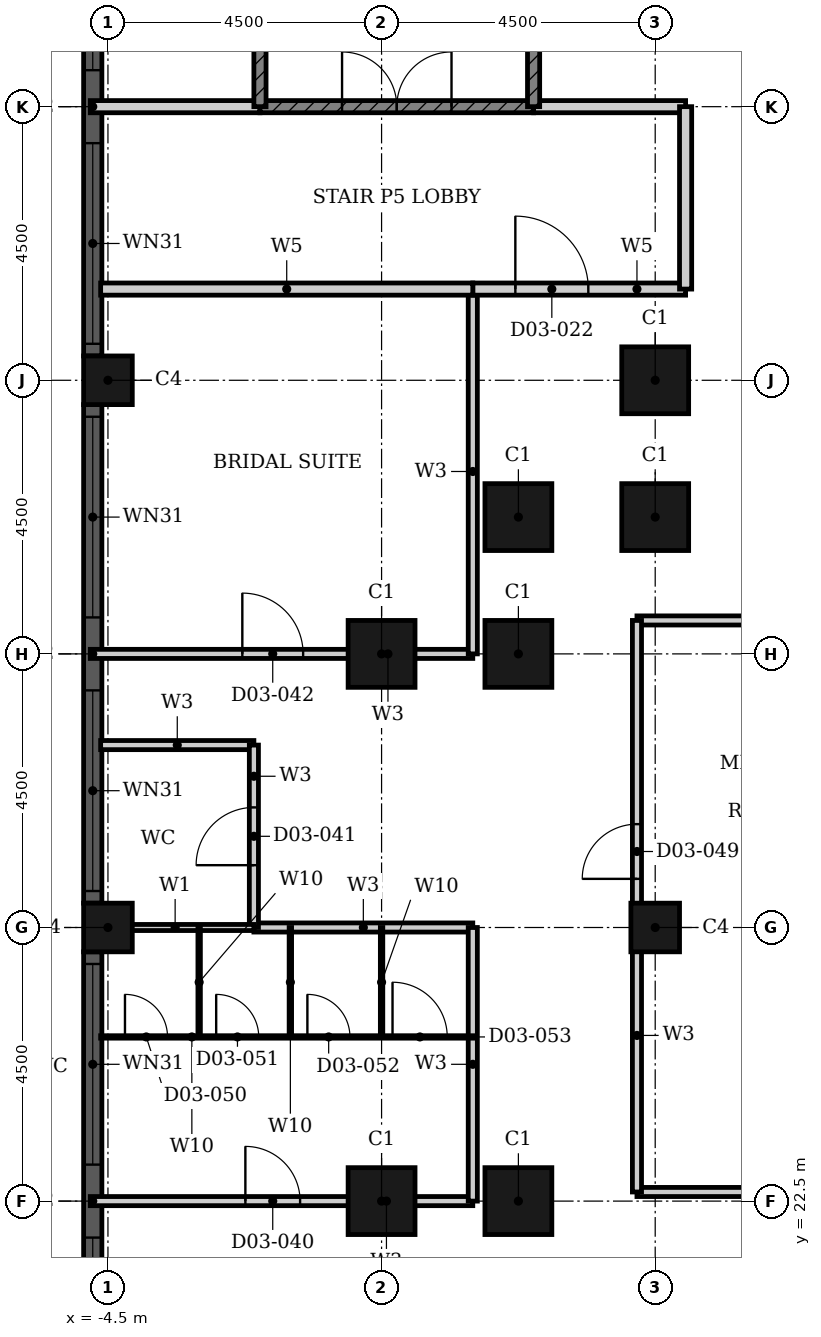
"""IFC4 building model, lengths in metres.
Left out: names, types, materials, properties, quantities, classifications, styles, units other than length and angle.
Written with IfcOpenShell. Run it as: python <this file> out.ifc"""

import sys

from ifc_helpers import new_model, si_unit, direction, frame, frame_2d, origin, origin_2d, place, context, subcontext, project, spatial, rectangle, hollow_rectangle, extrude, element, fill, save


model = new_model("IFC4")
c1 = context("Model", 3, precision=1e-05, world=origin(), true_north=direction((0.0, 1.0)))
c2 = subcontext(c1, "Body", "Model", "MODEL_VIEW")
j1 = project(units=[si_unit("LENGTHUNIT", "METRE"), si_unit("PLANEANGLEUNIT", "RADIAN")], contexts=[c1])
p1 = place(None, origin())
s1 = spatial("IfcSite", under=j1, at=p1, CompositionType="ELEMENT")
p2 = place(p1, origin())
s2 = spatial("IfcBuilding", under=s1, at=p2, CompositionType="ELEMENT")
p3 = place(p2, frame((0.0, 0.0, 17.4)))
s3 = spatial("IfcBuildingStorey", under=s2, at=p3, CompositionType="ELEMENT", Elevation=17.4)
for number, where, z_axis, x_axis in (
    (1, (4.5, 36.0, 0.0), (0.0, 0.0, 1.0), (1.0, 0.0, 0.0)),
    (2, (4.5, 33.75, 0.0), (0.0, 0.0, 1.0), (1.0, 0.0, 0.0)),
    (3, (2.25, 33.75, 0.0), (0.0, 0.0, 1.0), (1.0, 0.0, 0.0)),
    (4, (2.25, 31.5, 0.0), (0.0, 0.0, 1.0), (1.0, 0.0, 0.0)),
    (5, (0.0, 31.5, 0.0), (0.0, 0.0, 1.0), (1.0, 0.0, 0.0)),
    (6, (0.0, 22.5, 0.0), (0.0, 0.0, 1.0), (1.0, 0.0, 0.0)),
    (7, (2.25, 22.5, 0.0), (0.0, 0.0, 1.0), (1.0, 0.0, 0.0)),
):
    element("IfcColumn", number, at=place(p3, frame(where, z_axis=z_axis, x_axis=x_axis)), inside=s3, PredefinedType="COLUMN", context=c2, shape_type="SweptSolid", body=[
        extrude(hollow_rectangle(XDim=1.1, YDim=1.1, WallThickness=0.036, at=origin_2d()), origin(), (0.0, 0.0, 1.0), 6.6),
    ])
for number, where, z_axis, x_axis in (
    (8, (-4.5, 27.0, 0.0), (0.0, 0.0, 1.0), (1.0, 0.0, 0.0)),
    (9, (-4.5, 36.0, 0.0), (0.0, 0.0, 1.0), (1.0, 0.0, 0.0)),
    (10, (4.5, 27.0, 0.0), (0.0, 0.0, 1.0), (1.0, 0.0, 0.0)),
):
    element("IfcColumn", number, at=place(p3, frame(where, z_axis=z_axis, x_axis=x_axis)), inside=s3, PredefinedType="COLUMN", context=c2, shape_type="SweptSolid", body=[
        extrude(hollow_rectangle(XDim=0.8, YDim=0.8, WallThickness=0.025, at=origin_2d()), origin(), (0.0, 0.0, 1.0), 6.6),
    ])
p4 = place(p3, frame((-4.75, 44.6, 0.0), z_axis=(0.0, 0.0, 1.0), x_axis=(0.0, -1.0, 0.0)))
e11 = element("IfcWall", 11, at=p4, inside=s3, PredefinedType="SOLIDWALL", context=c2, shape_type="SweptSolid", body=[
    extrude(rectangle(XDim=8.2, YDim=0.3, at=frame_2d((4.1, 0.0))), origin(), (0.0, 0.0, 1.0), 6.6),
])
p5 = place(p4, frame((0.2, 0.0, 0.9)))
e12 = element("IfcOpeningElement", 12, at=p5, cuts=e11, PredefinedType="OPENING", context=c2, shape_type="SweptSolid", body=[
    extrude(rectangle(XDim=3.3, YDim=3.6, at=frame_2d((1.65, 1.8))), frame((0.0, 0.16, 0.0), z_axis=(0.0, -1.0, 0.0), x_axis=(1.0, 0.0, 0.0)), (0.0, 0.0, 1.0), 0.32),
])
p6 = place(p4, frame((4.7, 0.0, 0.9)))
e13 = element("IfcOpeningElement", 13, at=p6, cuts=e11, PredefinedType="OPENING", context=c2, shape_type="SweptSolid", body=[
    extrude(rectangle(XDim=3.3, YDim=3.6, at=frame_2d((1.65, 1.8))), frame((0.0, 0.16, 0.0), z_axis=(0.0, -1.0, 0.0), x_axis=(1.0, 0.0, 0.0)), (0.0, 0.0, 1.0), 0.32),
])
p7 = place(p3, frame((-4.75, 35.6, 0.0), z_axis=(0.0, 0.0, 1.0), x_axis=(0.0, -1.0, 0.0)))
e14 = element("IfcWall", 14, at=p7, inside=s3, PredefinedType="SOLIDWALL", context=c2, shape_type="SweptSolid", body=[
    extrude(rectangle(XDim=8.2, YDim=0.3, at=frame_2d((4.1, 0.0))), origin(), (0.0, 0.0, 1.0), 6.6),
])
p8 = place(p7, frame((0.2, 0.0, 0.9)))
e15 = element("IfcOpeningElement", 15, at=p8, cuts=e14, PredefinedType="OPENING", context=c2, shape_type="SweptSolid", body=[
    extrude(rectangle(XDim=3.3, YDim=3.6, at=frame_2d((1.65, 1.8))), frame((0.0, 0.16, 0.0), z_axis=(0.0, -1.0, 0.0), x_axis=(1.0, 0.0, 0.0)), (0.0, 0.0, 1.0), 0.32),
])
p9 = place(p7, frame((4.7, 0.0, 0.9)))
e16 = element("IfcOpeningElement", 16, at=p9, cuts=e14, PredefinedType="OPENING", context=c2, shape_type="SweptSolid", body=[
    extrude(rectangle(XDim=3.3, YDim=3.6, at=frame_2d((1.65, 1.8))), frame((0.0, 0.16, 0.0), z_axis=(0.0, -1.0, 0.0), x_axis=(1.0, 0.0, 0.0)), (0.0, 0.0, 1.0), 0.32),
])
p10 = place(p3, frame((-4.75, 26.6, 0.0), z_axis=(0.0, 0.0, 1.0), x_axis=(0.0, -1.0, 0.0)))
e17 = element("IfcWall", 17, at=p10, inside=s3, PredefinedType="SOLIDWALL", context=c2, shape_type="SweptSolid", body=[
    extrude(rectangle(XDim=8.2, YDim=0.3, at=frame_2d((4.1, 0.0))), origin(), (0.0, 0.0, 1.0), 6.6),
])
p11 = place(p10, frame((0.2, 0.0, 0.9)))
e18 = element("IfcOpeningElement", 18, at=p11, cuts=e17, PredefinedType="OPENING", context=c2, shape_type="SweptSolid", body=[
    extrude(rectangle(XDim=3.3, YDim=3.6, at=frame_2d((1.65, 1.8))), frame((0.0, 0.16, 0.0), z_axis=(0.0, -1.0, 0.0), x_axis=(1.0, 0.0, 0.0)), (0.0, 0.0, 1.0), 0.32),
])
p12 = place(p10, frame((4.7, 0.0, 0.9)))
e19 = element("IfcOpeningElement", 19, at=p12, cuts=e17, PredefinedType="OPENING", context=c2, shape_type="SweptSolid", body=[
    extrude(rectangle(XDim=3.3, YDim=3.6, at=frame_2d((1.65, 1.8))), frame((0.0, 0.16, 0.0), z_axis=(0.0, -1.0, 0.0), x_axis=(1.0, 0.0, 0.0)), (0.0, 0.0, 1.0), 0.32),
])
p13 = place(p3, frame((-4.79, 22.5, 0.0), z_axis=(0.0, 0.0, 1.0), x_axis=(1.0, 0.0, 0.0)))
e20 = element("IfcWall", 20, at=p13, inside=s3, PredefinedType="PARTITIONING", context=c2, shape_type="SweptSolid", body=[
    extrude(rectangle(XDim=6.29, YDim=0.15, at=frame_2d((3.145, 0.0))), origin(), (0.0, 0.0, 1.0), 6.25),
])
p14 = place(p13, frame((2.55, 0.0, 0.0)))
e21 = element("IfcOpeningElement", 21, at=p14, cuts=e20, PredefinedType="OPENING", context=c2, shape_type="SweptSolid", body=[
    extrude(rectangle(XDim=0.9, YDim=2.1, at=frame_2d((0.45, 1.05))), frame((0.0, 0.085, 0.0), z_axis=(0.0, -1.0, 0.0), x_axis=(1.0, 0.0, 0.0)), (0.0, 0.0, 1.0), 0.17),
])
p15 = place(p3, frame((4.2, 22.65, 0.0), z_axis=(0.0, 0.0, 1.0), x_axis=(1.0, 0.0, 0.0)))
e22 = element("IfcWall", 22, at=p15, inside=s3, PredefinedType="PARTITIONING", context=c2, shape_type="SweptSolid", body=[
    extrude(rectangle(XDim=4.45, YDim=0.15, at=frame_2d((2.225, 0.0))), origin(), (0.0, 0.0, 1.0), 6.25),
])
p16 = place(p3, frame((-2.1, 27.0, 0.0), z_axis=(0.0, 0.0, 1.0), x_axis=(1.0, 0.0, 0.0)))
e23 = element("IfcWall", 23, at=p16, inside=s3, PredefinedType="PARTITIONING", context=c2, shape_type="SweptSolid", body=[
    extrude(rectangle(XDim=3.6, YDim=0.15, at=frame_2d((1.8, 0.0))), origin(), (0.0, 0.0, 1.0), 6.25),
])
p17 = place(p3, frame((-4.62, 30.0, 0.0), z_axis=(0.0, 0.0, 1.0), x_axis=(1.0, 0.0, 0.0)))
e24 = element("IfcWall", 24, at=p17, inside=s3, PredefinedType="PARTITIONING", context=c2, shape_type="SweptSolid", body=[
    extrude(rectangle(XDim=2.52, YDim=0.15, at=frame_2d((1.26, 0.0))), origin(), (0.0, 0.0, 1.0), 6.25),
])
p18 = place(p3, frame((-4.79, 31.5, 0.0), z_axis=(0.0, 0.0, 1.0), x_axis=(1.0, 0.0, 0.0)))
e25 = element("IfcWall", 25, at=p18, inside=s3, PredefinedType="PARTITIONING", context=c2, shape_type="SweptSolid", body=[
    extrude(rectangle(XDim=6.29, YDim=0.15, at=frame_2d((3.145, 0.0))), origin(), (0.0, 0.0, 1.0), 6.25),
])
p19 = place(p18, frame((2.5, 0.0, 0.0)))
e26 = element("IfcOpeningElement", 26, at=p19, cuts=e25, PredefinedType="OPENING", context=c2, shape_type="SweptSolid", body=[
    extrude(rectangle(XDim=1.0, YDim=2.1, at=frame_2d((0.5, 1.05))), frame((0.0, 0.085, 0.0), z_axis=(0.0, -1.0, 0.0), x_axis=(1.0, 0.0, 0.0)), (0.0, 0.0, 1.0), 0.17),
])
p20 = place(p3, frame((4.2, 32.05, 0.0), z_axis=(0.0, 0.0, 1.0), x_axis=(1.0, 0.0, 0.0)))
e27 = element("IfcWall", 27, at=p20, inside=s3, PredefinedType="PARTITIONING", context=c2, shape_type="SweptSolid", body=[
    extrude(rectangle(XDim=4.45, YDim=0.15, at=frame_2d((2.225, 0.0))), origin(), (0.0, 0.0, 1.0), 6.25),
])
p21 = place(p3, frame((-2.1, 27.0, 0.0), z_axis=(0.0, 0.0, 1.0), x_axis=(0.0, 1.0, 0.0)))
e28 = element("IfcWall", 28, at=p21, inside=s3, PredefinedType="PARTITIONING", context=c2, shape_type="SweptSolid", body=[
    extrude(rectangle(XDim=3.0, YDim=0.15, at=frame_2d((1.5, 0.0))), origin(), (0.0, 0.0, 1.0), 6.25),
])
p22 = place(p21, frame((1.025, 0.0, 0.0)))
e29 = element("IfcOpeningElement", 29, at=p22, cuts=e28, PredefinedType="OPENING", context=c2, shape_type="SweptSolid", body=[
    extrude(rectangle(XDim=0.95, YDim=2.1, at=frame_2d((0.475, 1.05))), frame((0.0, 0.085, 0.0), z_axis=(0.0, -1.0, 0.0), x_axis=(1.0, 0.0, 0.0)), (0.0, 0.0, 1.0), 0.17),
])
p23 = place(p3, frame((1.5, 22.5, 0.0), z_axis=(0.0, 0.0, 1.0), x_axis=(0.0, 1.0, 0.0)))
e30 = element("IfcWall", 30, at=p23, inside=s3, PredefinedType="PARTITIONING", context=c2, shape_type="SweptSolid", body=[
    extrude(rectangle(XDim=4.5, YDim=0.15, at=frame_2d((2.25, 0.0))), origin(), (0.0, 0.0, 1.0), 6.25),
])
p24 = place(p3, frame((1.5, 31.5, 0.0), z_axis=(0.0, 0.0, 1.0), x_axis=(0.0, 1.0, 0.0)))
e31 = element("IfcWall", 31, at=p24, inside=s3, PredefinedType="PARTITIONING", context=c2, shape_type="SweptSolid", body=[
    extrude(rectangle(XDim=6.0, YDim=0.15, at=frame_2d((3.0, 0.0))), origin(), (0.0, 0.0, 1.0), 6.25),
])
p25 = place(p3, frame((4.2, 22.65, 0.0), z_axis=(0.0, 0.0, 1.0), x_axis=(0.0, 1.0, 0.0)))
e32 = element("IfcWall", 32, at=p25, inside=s3, PredefinedType="PARTITIONING", context=c2, shape_type="SweptSolid", body=[
    extrude(rectangle(XDim=9.4, YDim=0.15, at=frame_2d((4.7, 0.0))), origin(), (0.0, 0.0, 1.0), 6.25),
])
p26 = place(p25, frame((5.15, 0.0, 0.0)))
e33 = element("IfcOpeningElement", 33, at=p26, cuts=e32, PredefinedType="OPENING", context=c2, shape_type="SweptSolid", body=[
    extrude(rectangle(XDim=0.9, YDim=2.1, at=frame_2d((0.45, 1.05))), frame((0.0, 0.085, 0.0), z_axis=(0.0, -1.0, 0.0), x_axis=(1.0, 0.0, 0.0)), (0.0, 0.0, 1.0), 0.17),
])
p27 = place(p3, frame((-4.69, 27.0, 0.0), z_axis=(0.0, 0.0, 1.0), x_axis=(1.0, 0.0, 0.0)))
e34 = element("IfcWall", 34, at=p27, inside=s3, PredefinedType="PARTITIONING", context=c2, shape_type="SweptSolid", body=[
    extrude(rectangle(XDim=2.59, YDim=0.1, at=frame_2d((1.295, 0.0))), origin(), (0.0, 0.0, 1.0), 6.25),
])
p28 = place(p3, frame((1.5, 37.5, 0.0), z_axis=(0.0, 0.0, 1.0), x_axis=(1.0, 0.0, 0.0)))
e35 = element("IfcWall", 35, at=p28, inside=s3, PredefinedType="PARTITIONING", context=c2, shape_type="SweptSolid", body=[
    extrude(rectangle(XDim=3.5, YDim=0.2, at=frame_2d((1.75, 0.0))), origin(), (0.0, 0.0, 1.0), 6.25),
])
p29 = place(p28, frame((0.7, 0.0, 0.0)))
e36 = element("IfcOpeningElement", 36, at=p29, cuts=e35, PredefinedType="OPENING", context=c2, shape_type="SweptSolid", body=[
    extrude(rectangle(XDim=1.2, YDim=2.1, at=frame_2d((0.6, 1.05))), frame((0.0, 0.11, 0.0), z_axis=(0.0, -1.0, 0.0), x_axis=(1.0, 0.0, 0.0)), (0.0, 0.0, 1.0), 0.22),
])
p30 = place(p3, frame((-4.62, 37.5, 0.0), z_axis=(0.0, 0.0, 1.0), x_axis=(1.0, 0.0, 0.0)))
e37 = element("IfcWall", 37, at=p30, inside=s3, PredefinedType="PARTITIONING", context=c2, shape_type="SweptSolid", body=[
    extrude(rectangle(XDim=6.12, YDim=0.2, at=frame_2d((3.06, 0.0))), origin(), (0.0, 0.0, 1.0), 6.25),
])
p31 = place(p3, frame((2.5, 40.5, 0.0), z_axis=(0.0, 0.0, 1.0), x_axis=(1.0, 0.0, 0.0)))
e38 = element("IfcWall", 38, at=p31, inside=s3, PredefinedType="PARTITIONING", context=c2, shape_type="SweptSolid", body=[
    extrude(rectangle(XDim=2.5, YDim=0.2, at=frame_2d((1.25, 0.0))), origin(), (0.0, 0.0, 1.0), 6.25),
])
p32 = place(p3, frame((-4.79, 40.5, 0.0), z_axis=(0.0, 0.0, 1.0), x_axis=(1.0, 0.0, 0.0)))
e39 = element("IfcWall", 39, at=p32, inside=s3, PredefinedType="PARTITIONING", context=c2, shape_type="SweptSolid", body=[
    extrude(rectangle(XDim=2.79, YDim=0.2, at=frame_2d((1.395, 0.0))), origin(), (0.0, 0.0, 1.0), 6.25),
])
p33 = place(p3, frame((5.0, 37.5, 0.0), z_axis=(0.0, 0.0, 1.0), x_axis=(0.0, 1.0, 0.0)))
e40 = element("IfcWall", 40, at=p33, inside=s3, PredefinedType="PARTITIONING", context=c2, shape_type="SweptSolid", body=[
    extrude(rectangle(XDim=3.0, YDim=0.2, at=frame_2d((1.5, 0.0))), origin(), (0.0, 0.0, 1.0), 6.25),
])
p34 = place(p3, frame((-2.0, 40.5, 0.0), z_axis=(0.0, 0.0, 1.0), x_axis=(1.0, 0.0, 0.0)))
e41 = element("IfcWall", 41, at=p34, inside=s3, PredefinedType="SHEAR", context=c2, shape_type="SweptSolid", body=[
    extrude(rectangle(XDim=4.5, YDim=0.2, at=frame_2d((2.25, 0.0))), origin(), (0.0, 0.0, 1.0), 6.25),
])
p35 = place(p34, frame((1.35, 0.0, 0.0)))
e42 = element("IfcOpeningElement", 42, at=p35, cuts=e41, PredefinedType="OPENING", context=c2, shape_type="SweptSolid", body=[
    extrude(rectangle(XDim=1.8, YDim=2.1, at=frame_2d((0.9, 1.05))), frame((0.0, 0.11, 0.0), z_axis=(0.0, -1.0, 0.0), x_axis=(1.0, 0.0, 0.0)), (0.0, 0.0, 1.0), 0.22),
])
p36 = place(p3, frame((-2.0, 40.5, 0.0), z_axis=(0.0, 0.0, 1.0), x_axis=(0.0, 1.0, 0.0)))
e43 = element("IfcWall", 43, at=p36, inside=s3, PredefinedType="SHEAR", context=c2, shape_type="SweptSolid", body=[
    extrude(rectangle(XDim=8.45, YDim=0.2, at=frame_2d((4.225, 0.0))), origin(), (0.0, 0.0, 1.0), 6.25),
])
p37 = place(p3, frame((2.5, 40.5, 0.0), z_axis=(0.0, 0.0, 1.0), x_axis=(0.0, 1.0, 0.0)))
e44 = element("IfcWall", 44, at=p37, inside=s3, PredefinedType="SHEAR", context=c2, shape_type="SweptSolid", body=[
    extrude(rectangle(XDim=4.5, YDim=0.2, at=frame_2d((2.25, 0.0))), origin(), (0.0, 0.0, 1.0), 6.25),
])
for number, where, z_axis, x_axis in (
    (45, (-3.0, 27.0, 0.0), (0.0, 0.0, 1.0), (0.0, -1.0, 0.0)),
    (46, (-1.5, 27.0, 0.0), (0.0, 0.0, 1.0), (0.0, -1.0, 0.0)),
    (47, (0.0, 27.0, 0.0), (0.0, 0.0, 1.0), (0.0, -1.0, 0.0)),
):
    element("IfcWall", number, at=place(p3, frame(where, z_axis=z_axis, x_axis=x_axis)), inside=s3, PredefinedType="PARTITIONING", context=c2, shape_type="SweptSolid", body=[
        extrude(rectangle(XDim=1.8, YDim=0.04, at=frame_2d((0.9, 0.0))), origin(), (0.0, 0.0, 1.0), 6.25),
    ])
p38 = place(p3, frame((-4.62, 25.2, 0.0), z_axis=(0.0, 0.0, 1.0), x_axis=(1.0, 0.0, 0.0)))
e48 = element("IfcWall", 48, at=p38, inside=s3, PredefinedType="PARTITIONING", context=c2, shape_type="SweptSolid", body=[
    extrude(rectangle(XDim=6.12, YDim=0.04, at=frame_2d((3.06, 0.0))), origin(), (0.0, 0.0, 1.0), 6.25),
])
p39 = place(p38, frame((0.4, 0.0, 0.0)))
e49 = element("IfcOpeningElement", 49, at=p39, cuts=e48, PredefinedType="OPENING", context=c2, shape_type="SweptSolid", body=[
    extrude(rectangle(XDim=0.7, YDim=2.0, at=frame_2d((0.35, 1.0))), frame((0.0, 0.03, 0.0), z_axis=(0.0, -1.0, 0.0), x_axis=(1.0, 0.0, 0.0)), (0.0, 0.0, 1.0), 0.06),
])
p40 = place(p38, frame((1.9, 0.0, 0.0)))
e50 = element("IfcOpeningElement", 50, at=p40, cuts=e48, PredefinedType="OPENING", context=c2, shape_type="SweptSolid", body=[
    extrude(rectangle(XDim=0.7, YDim=2.0, at=frame_2d((0.35, 1.0))), frame((0.0, 0.03, 0.0), z_axis=(0.0, -1.0, 0.0), x_axis=(1.0, 0.0, 0.0)), (0.0, 0.0, 1.0), 0.06),
])
p41 = place(p38, frame((3.4, 0.0, 0.0)))
e51 = element("IfcOpeningElement", 51, at=p41, cuts=e48, PredefinedType="OPENING", context=c2, shape_type="SweptSolid", body=[
    extrude(rectangle(XDim=0.7, YDim=2.0, at=frame_2d((0.35, 1.0))), frame((0.0, 0.03, 0.0), z_axis=(0.0, -1.0, 0.0), x_axis=(1.0, 0.0, 0.0)), (0.0, 0.0, 1.0), 0.06),
])
p42 = place(p38, frame((4.8, 0.0, 0.0)))
e52 = element("IfcOpeningElement", 52, at=p42, cuts=e48, PredefinedType="OPENING", context=c2, shape_type="SweptSolid", body=[
    extrude(rectangle(XDim=0.9, YDim=2.0, at=frame_2d((0.45, 1.0))), frame((0.0, 0.03, 0.0), z_axis=(0.0, -1.0, 0.0), x_axis=(1.0, 0.0, 0.0)), (0.0, 0.0, 1.0), 0.06),
])
p43 = place(p5, origin())
e53 = element("IfcWindow", 53, at=p43, inside=s3, PartitioningType="SINGLE_PANEL", PredefinedType="WINDOW", context=c2, shape_type="SweptSolid", body=[
    extrude(rectangle(XDim=3.3, YDim=3.6, at=frame_2d((1.65, 1.8))), frame((0.0, 0.03, 0.0), z_axis=(0.0, -1.0, 0.0), x_axis=(1.0, 0.0, 0.0)), (0.0, 0.0, 1.0), 0.06),
])
fill(e12, e53)
p44 = place(p6, origin())
e54 = element("IfcWindow", 54, at=p44, inside=s3, PartitioningType="SINGLE_PANEL", PredefinedType="WINDOW", context=c2, shape_type="SweptSolid", body=[
    extrude(rectangle(XDim=3.3, YDim=3.6, at=frame_2d((1.65, 1.8))), frame((0.0, 0.03, 0.0), z_axis=(0.0, -1.0, 0.0), x_axis=(1.0, 0.0, 0.0)), (0.0, 0.0, 1.0), 0.06),
])
fill(e13, e54)
p45 = place(p8, origin())
e55 = element("IfcWindow", 55, at=p45, inside=s3, PartitioningType="SINGLE_PANEL", PredefinedType="WINDOW", context=c2, shape_type="SweptSolid", body=[
    extrude(rectangle(XDim=3.3, YDim=3.6, at=frame_2d((1.65, 1.8))), frame((0.0, 0.03, 0.0), z_axis=(0.0, -1.0, 0.0), x_axis=(1.0, 0.0, 0.0)), (0.0, 0.0, 1.0), 0.06),
])
fill(e15, e55)
p46 = place(p9, origin())
e56 = element("IfcWindow", 56, at=p46, inside=s3, PartitioningType="SINGLE_PANEL", PredefinedType="WINDOW", context=c2, shape_type="SweptSolid", body=[
    extrude(rectangle(XDim=3.3, YDim=3.6, at=frame_2d((1.65, 1.8))), frame((0.0, 0.03, 0.0), z_axis=(0.0, -1.0, 0.0), x_axis=(1.0, 0.0, 0.0)), (0.0, 0.0, 1.0), 0.06),
])
fill(e16, e56)
p47 = place(p11, origin())
e57 = element("IfcWindow", 57, at=p47, inside=s3, PartitioningType="SINGLE_PANEL", PredefinedType="WINDOW", context=c2, shape_type="SweptSolid", body=[
    extrude(rectangle(XDim=3.3, YDim=3.6, at=frame_2d((1.65, 1.8))), frame((0.0, 0.03, 0.0), z_axis=(0.0, -1.0, 0.0), x_axis=(1.0, 0.0, 0.0)), (0.0, 0.0, 1.0), 0.06),
])
fill(e18, e57)
p48 = place(p12, origin())
e58 = element("IfcWindow", 58, at=p48, inside=s3, PartitioningType="SINGLE_PANEL", PredefinedType="WINDOW", context=c2, shape_type="SweptSolid", body=[
    extrude(rectangle(XDim=3.3, YDim=3.6, at=frame_2d((1.65, 1.8))), frame((0.0, 0.03, 0.0), z_axis=(0.0, -1.0, 0.0), x_axis=(1.0, 0.0, 0.0)), (0.0, 0.0, 1.0), 0.06),
])
fill(e19, e58)
p49 = place(p29, origin())
e59 = element("IfcDoor", 59, at=p49, inside=s3, OperationType="SINGLE_SWING_LEFT", PredefinedType="DOOR", context=c2, shape_type="SweptSolid", body=[
    extrude(rectangle(XDim=1.2, YDim=2.1, at=frame_2d((0.6, 1.05))), frame((0.0, 0.025, 0.0), z_axis=(0.0, -1.0, 0.0), x_axis=(1.0, 0.0, 0.0)), (0.0, 0.0, 1.0), 0.05),
])
fill(e36, e59)
p50 = place(p35, origin())
e60 = element("IfcDoor", 60, at=p50, inside=s3, OperationType="DOUBLE_DOOR_SINGLE_SWING", PredefinedType="DOOR", context=c2, shape_type="SweptSolid", body=[
    extrude(rectangle(XDim=1.8, YDim=2.1, at=frame_2d((0.9, 1.05))), frame((0.0, 0.025, 0.0), z_axis=(0.0, -1.0, 0.0), x_axis=(1.0, 0.0, 0.0)), (0.0, 0.0, 1.0), 0.05),
])
fill(e42, e60)
p51 = place(p14, origin())
e61 = element("IfcDoor", 61, at=p51, inside=s3, OperationType="SINGLE_SWING_RIGHT", PredefinedType="DOOR", context=c2, shape_type="SweptSolid", body=[
    extrude(rectangle(XDim=0.9, YDim=2.1, at=frame_2d((0.45, 1.05))), frame((0.0, 0.025, 0.0), z_axis=(0.0, -1.0, 0.0), x_axis=(1.0, 0.0, 0.0)), (0.0, 0.0, 1.0), 0.05),
])
fill(e21, e61)
p52 = place(p22, origin())
e62 = element("IfcDoor", 62, at=p52, inside=s3, OperationType="SINGLE_SWING_LEFT", PredefinedType="DOOR", context=c2, shape_type="SweptSolid", body=[
    extrude(rectangle(XDim=0.95, YDim=2.1, at=frame_2d((0.475, 1.05))), frame((0.0, 0.025, 0.0), z_axis=(0.0, -1.0, 0.0), x_axis=(1.0, 0.0, 0.0)), (0.0, 0.0, 1.0), 0.05),
])
fill(e29, e62)
p53 = place(p19, origin())
e63 = element("IfcDoor", 63, at=p53, inside=s3, OperationType="SINGLE_SWING_LEFT", PredefinedType="DOOR", context=c2, shape_type="SweptSolid", body=[
    extrude(rectangle(XDim=1.0, YDim=2.1, at=frame_2d((0.5, 1.05))), frame((0.0, 0.025, 0.0), z_axis=(0.0, -1.0, 0.0), x_axis=(1.0, 0.0, 0.0)), (0.0, 0.0, 1.0), 0.05),
])
fill(e26, e63)
p54 = place(p26, origin())
e64 = element("IfcDoor", 64, at=p54, inside=s3, OperationType="SINGLE_SWING_RIGHT", PredefinedType="DOOR", context=c2, shape_type="SweptSolid", body=[
    extrude(rectangle(XDim=0.9, YDim=2.1, at=frame_2d((0.45, 1.05))), frame((0.0, 0.025, 0.0), z_axis=(0.0, -1.0, 0.0), x_axis=(1.0, 0.0, 0.0)), (0.0, 0.0, 1.0), 0.05),
])
fill(e33, e64)
p55 = place(p39, origin())
e65 = element("IfcDoor", 65, at=p55, inside=s3, OperationType="SINGLE_SWING_LEFT", PredefinedType="DOOR", context=c2, shape_type="SweptSolid", body=[
    extrude(rectangle(XDim=0.7, YDim=2.0, at=frame_2d((0.35, 1.0))), frame((0.0, 0.02, 0.0), z_axis=(0.0, -1.0, 0.0), x_axis=(1.0, 0.0, 0.0)), (0.0, 0.0, 1.0), 0.04),
])
fill(e49, e65)
p56 = place(p40, origin())
e66 = element("IfcDoor", 66, at=p56, inside=s3, OperationType="SINGLE_SWING_LEFT", PredefinedType="DOOR", context=c2, shape_type="SweptSolid", body=[
    extrude(rectangle(XDim=0.7, YDim=2.0, at=frame_2d((0.35, 1.0))), frame((0.0, 0.02, 0.0), z_axis=(0.0, -1.0, 0.0), x_axis=(1.0, 0.0, 0.0)), (0.0, 0.0, 1.0), 0.04),
])
fill(e50, e66)
p57 = place(p41, origin())
e67 = element("IfcDoor", 67, at=p57, inside=s3, OperationType="SINGLE_SWING_RIGHT", PredefinedType="DOOR", context=c2, shape_type="SweptSolid", body=[
    extrude(rectangle(XDim=0.7, YDim=2.0, at=frame_2d((0.35, 1.0))), frame((0.0, 0.02, 0.0), z_axis=(0.0, -1.0, 0.0), x_axis=(1.0, 0.0, 0.0)), (0.0, 0.0, 1.0), 0.04),
])
fill(e51, e67)
p58 = place(p42, origin())
e68 = element("IfcDoor", 68, at=p58, inside=s3, OperationType="SINGLE_SWING_RIGHT", PredefinedType="DOOR", context=c2, shape_type="SweptSolid", body=[
    extrude(rectangle(XDim=0.9, YDim=2.0, at=frame_2d((0.45, 1.0))), frame((0.0, 0.02, 0.0), z_axis=(0.0, -1.0, 0.0), x_axis=(1.0, 0.0, 0.0)), (0.0, 0.0, 1.0), 0.04),
])
fill(e52, e68)
save(model, sys.argv[1])
